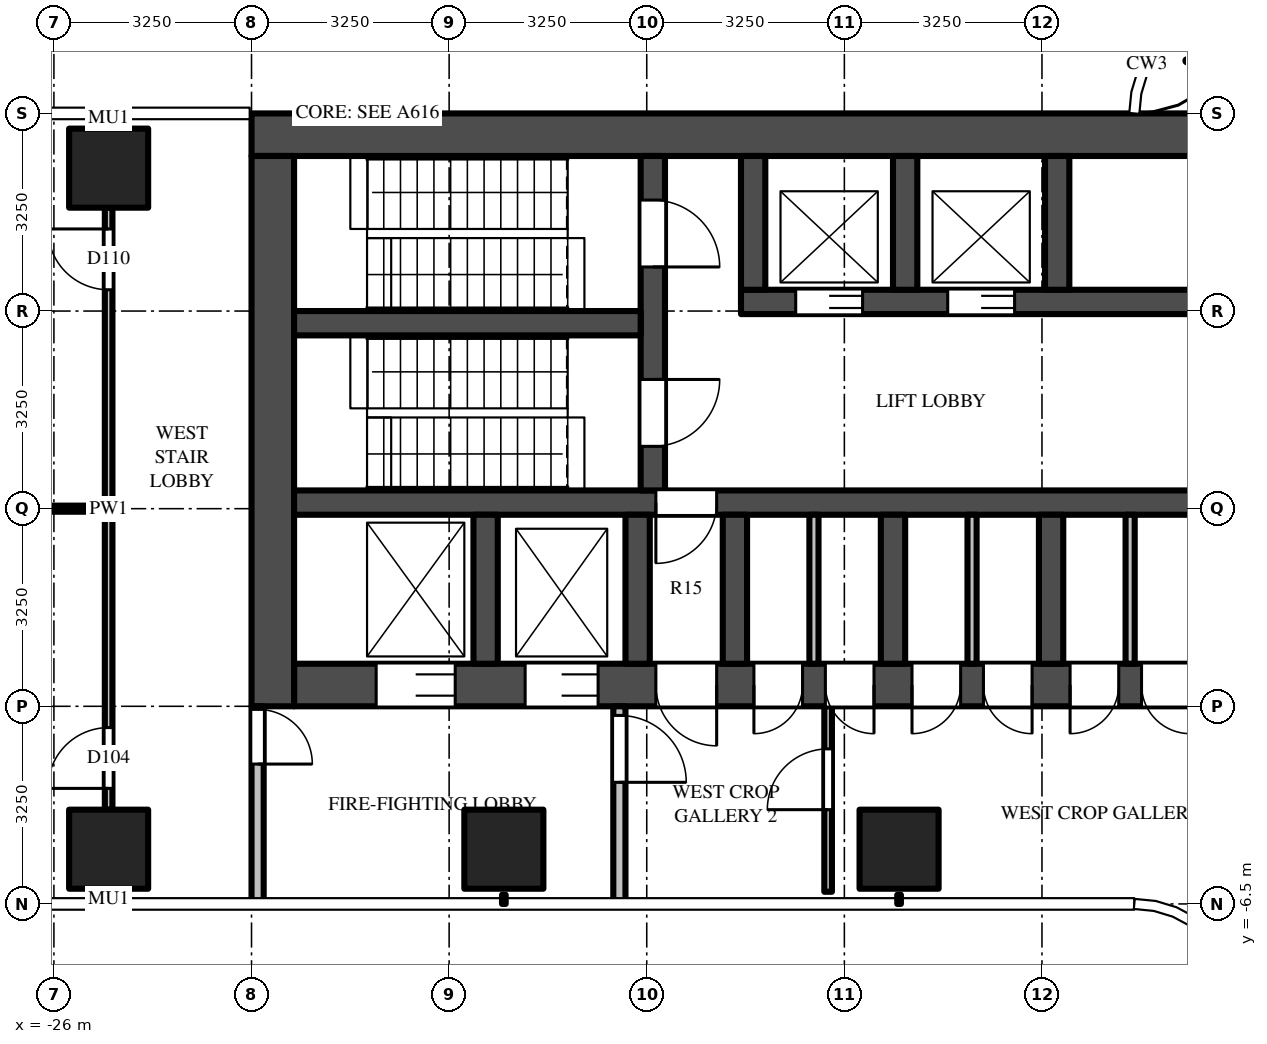
"""IFC4 building model, lengths in metres.
Left out: names, types, materials, properties, quantities, classifications, styles, units other than length and angle.
Written with IfcOpenShell. Run it as: python <this file> out.ifc"""

import sys

from ifc_helpers import new_model, si_unit, direction, frame, frame_2d, origin, origin_2d, place, context, subcontext, project, spatial, rectangle, extrude, source, transform, mapped, element, fill, save


model = new_model("IFC4")
c1 = context("Model", 3, precision=1e-05, world=origin(), true_north=direction((0.0, 1.0)))
c2 = subcontext(c1, "Body", "Model", "MODEL_VIEW")
j1 = project(units=[si_unit("LENGTHUNIT", "METRE"), si_unit("PLANEANGLEUNIT", "RADIAN")], contexts=[c1])
p1 = place(None, origin())
s1 = spatial("IfcSite", under=j1, at=p1, CompositionType="ELEMENT")
p2 = place(p1, origin())
s2 = spatial("IfcBuilding", under=s1, at=p2, CompositionType="ELEMENT")
p3 = place(p2, frame((0.0, 0.0, 142.5)))
s3 = spatial("IfcBuildingStorey", under=s2, at=p3, CompositionType="ELEMENT", Elevation=142.5)
m1 = source(origin(), c2, "Body", "SweptSolid", [
    extrude(rectangle(XDim=1.3, YDim=1.3, at=origin_2d()), origin(), (0.0, 0.0, 1.0), 4.5),
])
for number, where, z_axis, x_axis in (
    (1, (-12.1, -5.6, 0.0), (0.0, 0.0, 1.0), (1.0, 0.0, 0.0)),
    (2, (-18.6, -5.6, 0.0), (0.0, 0.0, 1.0), (1.0, 0.0, 0.0)),
    (3, (-25.1, -5.6, 0.0), (0.0, 0.0, 1.0), (1.0, 0.0, 0.0)),
    (4, (-25.1, 5.6, 0.0), (0.0, 0.0, 1.0), (1.0, 0.0, 0.0)),
):
    element("IfcColumn", number, at=place(p3, frame(where, z_axis=z_axis, x_axis=x_axis)), inside=s3, PredefinedType="COLUMN", context=c2, shape_type="MappedRepresentation", body=[
        mapped(m1, transform((0.0, 0.0, 0.0))),
    ])
m2 = source(origin(), c2, "Body", "SweptSolid", [
    extrude(rectangle(XDim=16.5, YDim=0.7, at=frame_2d((8.25, 0.0))), origin(), (0.0, 0.0, 1.0), 4.25),
])
p4 = place(p3, frame((-6.25, 6.15, 0.0), z_axis=(0.0, 0.0, 1.0), x_axis=(-1.0, 0.0, 0.0)))
e5 = element("IfcWall", 5, at=p4, inside=s3, PredefinedType="SHEAR", context=c2, shape_type="MappedRepresentation", body=[
    mapped(m2, transform((0.0, 0.0, 0.0))),
])
m3 = source(origin(), c2, "Body", "SweptSolid", [
    extrude(rectangle(XDim=14.85, YDim=0.7, at=frame_2d((7.425, 0.0))), origin(), (0.0, 0.0, 1.0), 4.25),
])
p5 = place(p3, frame((-7.2, -2.9, 0.0), z_axis=(0.0, 0.0, 1.0), x_axis=(-1.0, 0.0, 0.0)))
e6 = element("IfcWall", 6, at=p5, inside=s3, PredefinedType="SHEAR", context=c2, shape_type="MappedRepresentation", body=[
    mapped(m3, transform((0.0, 0.0, 0.0))),
])
m4 = source(origin(), c2, "Body", "SweptSolid", [
    extrude(rectangle(XDim=1.3, YDim=2.1, at=frame_2d((0.65, 1.05))), frame((0.0, 0.36, 0.0), z_axis=(0.0, -1.0, 0.0), x_axis=(1.0, 0.0, 0.0)), (0.0, 0.0, 1.0), 0.72),
])
p6 = place(p5, frame((12.2, 0.0, 0.0)))
e7 = element("IfcOpeningElement", 7, at=p6, cuts=e6, PredefinedType="OPENING", context=c2, shape_type="MappedRepresentation", body=[
    mapped(m4, transform((0.0, 0.0, 0.0))),
])
m5 = source(origin(), c2, "Body", "SweptSolid", [
    extrude(rectangle(XDim=1.2, YDim=2.1, at=frame_2d((0.6, 1.05))), frame((0.0, 0.36, 0.0), z_axis=(0.0, -1.0, 0.0), x_axis=(1.0, 0.0, 0.0)), (0.0, 0.0, 1.0), 0.72),
])
p7 = place(p5, frame((9.85, 0.0, 0.0)))
e8 = element("IfcOpeningElement", 8, at=p7, cuts=e6, PredefinedType="OPENING", context=c2, shape_type="MappedRepresentation", body=[
    mapped(m5, transform((0.0, 0.0, 0.0))),
])
m6 = source(origin(), c2, "Body", "SweptSolid", [
    extrude(rectangle(XDim=1.0, YDim=2.1, at=frame_2d((0.5, 1.05))), frame((0.0, 0.36, 0.0), z_axis=(0.0, -1.0, 0.0), x_axis=(1.0, 0.0, 0.0)), (0.0, 0.0, 1.0), 0.72),
])
p8 = place(p5, frame((7.9, 0.0, 0.0)))
e9 = element("IfcOpeningElement", 9, at=p8, cuts=e6, PredefinedType="OPENING", context=c2, shape_type="MappedRepresentation", body=[
    mapped(m6, transform((0.0, 0.0, 0.0))),
])
m7 = source(origin(), c2, "Body", "SweptSolid", [
    extrude(rectangle(XDim=0.8, YDim=2.1, at=frame_2d((0.4, 1.05))), frame((0.0, 0.36, 0.0), z_axis=(0.0, -1.0, 0.0), x_axis=(1.0, 0.0, 0.0)), (0.0, 0.0, 1.0), 0.72),
])
p9 = place(p5, frame((0.113, 0.0, 0.0)))
e10 = element("IfcOpeningElement", 10, at=p9, cuts=e6, PredefinedType="OPENING", context=c2, shape_type="MappedRepresentation", body=[
    mapped(m7, transform((0.0, 0.0, 0.0))),
])
p10 = place(p5, frame((1.288, 0.0, 0.0)))
e11 = element("IfcOpeningElement", 11, at=p10, cuts=e6, PredefinedType="OPENING", context=c2, shape_type="MappedRepresentation", body=[
    mapped(m7, transform((0.0, 0.0, 0.0))),
])
p11 = place(p5, frame((2.712, 0.0, 0.0)))
e12 = element("IfcOpeningElement", 12, at=p11, cuts=e6, PredefinedType="OPENING", context=c2, shape_type="MappedRepresentation", body=[
    mapped(m7, transform((0.0, 0.0, 0.0))),
])
p12 = place(p5, frame((3.887, 0.0, 0.0)))
e13 = element("IfcOpeningElement", 13, at=p12, cuts=e6, PredefinedType="OPENING", context=c2, shape_type="MappedRepresentation", body=[
    mapped(m7, transform((0.0, 0.0, 0.0))),
])
p13 = place(p5, frame((5.312, 0.0, 0.0)))
e14 = element("IfcOpeningElement", 14, at=p13, cuts=e6, PredefinedType="OPENING", context=c2, shape_type="MappedRepresentation", body=[
    mapped(m7, transform((0.0, 0.0, 0.0))),
])
p14 = place(p5, frame((6.488, 0.0, 0.0)))
e15 = element("IfcOpeningElement", 15, at=p14, cuts=e6, PredefinedType="OPENING", context=c2, shape_type="MappedRepresentation", body=[
    mapped(m7, transform((0.0, 0.0, 0.0))),
])
m8 = source(origin(), c2, "Body", "SweptSolid", [
    extrude(rectangle(XDim=9.05, YDim=0.7, at=frame_2d((4.525, 0.0))), origin(), (0.0, 0.0, 1.0), 4.25),
])
p15 = place(p3, frame((-22.4, 5.8, 0.0), z_axis=(0.0, 0.0, 1.0), x_axis=(0.0, -1.0, 0.0)))
e16 = element("IfcWall", 16, at=p15, inside=s3, PredefinedType="SHEAR", context=c2, shape_type="MappedRepresentation", body=[
    mapped(m8, transform((0.0, 0.0, 0.0))),
])
m9 = source(origin(), c2, "Body", "SweptSolid", [
    extrude(rectangle(XDim=7.5, YDim=0.4, at=frame_2d((3.75, 0.0))), origin(), (0.0, 0.0, 1.0), 4.25),
])
p16 = place(p3, frame((-7.2, 3.4, 0.0), z_axis=(0.0, 0.0, 1.0), x_axis=(-1.0, 0.0, 0.0)))
e17 = element("IfcWall", 17, at=p16, inside=s3, PredefinedType="SHEAR", context=c2, shape_type="MappedRepresentation", body=[
    mapped(m9, transform((0.0, 0.0, 0.0))),
])
m10 = source(origin(), c2, "Body", "SweptSolid", [
    extrude(rectangle(XDim=1.1, YDim=2.1, at=frame_2d((0.55, 1.05))), frame((0.0, 0.21, 0.0), z_axis=(0.0, -1.0, 0.0), x_axis=(1.0, 0.0, 0.0)), (0.0, 0.0, 1.0), 0.42),
])
p17 = place(p16, frame((3.0, 0.0, 0.0)))
e18 = element("IfcOpeningElement", 18, at=p17, cuts=e17, PredefinedType="OPENING", context=c2, shape_type="MappedRepresentation", body=[
    mapped(m10, transform((0.0, 0.0, 0.0))),
])
p18 = place(p16, frame((5.5, 0.0, 0.0)))
e19 = element("IfcOpeningElement", 19, at=p18, cuts=e17, PredefinedType="OPENING", context=c2, shape_type="MappedRepresentation", body=[
    mapped(m10, transform((0.0, 0.0, 0.0))),
])
m11 = source(origin(), c2, "Body", "SweptSolid", [
    extrude(rectangle(XDim=14.85, YDim=0.4, at=frame_2d((7.425, 0.0))), origin(), (0.0, 0.0, 1.0), 4.25),
])
p19 = place(p3, frame((-7.2, 0.1, 0.0), z_axis=(0.0, 0.0, 1.0), x_axis=(-1.0, 0.0, 0.0)))
e20 = element("IfcWall", 20, at=p19, inside=s3, PredefinedType="SHEAR", context=c2, shape_type="MappedRepresentation", body=[
    mapped(m11, transform((0.0, 0.0, 0.0))),
])
m12 = source(origin(), c2, "Body", "SweptSolid", [
    extrude(rectangle(XDim=1.0, YDim=2.1, at=frame_2d((0.5, 1.05))), frame((0.0, 0.21, 0.0), z_axis=(0.0, -1.0, 0.0), x_axis=(1.0, 0.0, 0.0)), (0.0, 0.0, 1.0), 0.42),
])
p20 = place(p19, frame((7.9, 0.0, 0.0)))
e21 = element("IfcOpeningElement", 21, at=p20, cuts=e20, PredefinedType="OPENING", context=c2, shape_type="MappedRepresentation", body=[
    mapped(m12, transform((0.0, 0.0, 0.0))),
])
m13 = source(origin(), c2, "Body", "SweptSolid", [
    extrude(rectangle(XDim=5.5, YDim=0.4, at=frame_2d((2.75, 0.0))), origin(), (0.0, 0.0, 1.0), 4.25),
])
p21 = place(p3, frame((-16.15, 5.8, 0.0), z_axis=(0.0, 0.0, 1.0), x_axis=(0.0, -1.0, 0.0)))
e22 = element("IfcWall", 22, at=p21, inside=s3, PredefinedType="SHEAR", context=c2, shape_type="MappedRepresentation", body=[
    mapped(m13, transform((0.0, 0.0, 0.0))),
])
p22 = place(p21, frame((0.725, 0.0, 0.0)))
e23 = element("IfcOpeningElement", 23, at=p22, cuts=e22, PredefinedType="OPENING", context=c2, shape_type="MappedRepresentation", body=[
    mapped(m10, transform((0.0, 0.0, 0.0))),
])
p23 = place(p21, frame((3.675, 0.0, 0.0)))
e24 = element("IfcOpeningElement", 24, at=p23, cuts=e22, PredefinedType="OPENING", context=c2, shape_type="MappedRepresentation", body=[
    mapped(m10, transform((0.0, 0.0, 0.0))),
])
m14 = source(origin(), c2, "Body", "SweptSolid", [
    extrude(rectangle(XDim=5.7, YDim=0.4, at=frame_2d((2.85, 0.0))), origin(), (0.0, 0.0, 1.0), 4.25),
])
p24 = place(p3, frame((-16.35, 3.05, 0.0), z_axis=(0.0, 0.0, 1.0), x_axis=(-1.0, 0.0, 0.0)))
e25 = element("IfcWall", 25, at=p24, inside=s3, PredefinedType="SHEAR", context=c2, shape_type="MappedRepresentation", body=[
    mapped(m14, transform((0.0, 0.0, 0.0))),
])
m15 = source(origin(), c2, "Body", "SweptSolid", [
    extrude(rectangle(XDim=2.2, YDim=0.4, at=frame_2d((1.1, 0.0))), origin(), (0.0, 0.0, 1.0), 4.25),
])
for number, where, z_axis, x_axis in (
    (26, (-9.5, 5.8, 0.0), (0.0, 0.0, 1.0), (0.0, -1.0, 0.0)),
    (27, (-12.0, 5.8, 0.0), (0.0, 0.0, 1.0), (0.0, -1.0, 0.0)),
    (28, (-14.5, 5.8, 0.0), (0.0, 0.0, 1.0), (0.0, -1.0, 0.0)),
):
    element("IfcWall", number, at=place(p3, frame(where, z_axis=z_axis, x_axis=x_axis)), inside=s3, PredefinedType="SHEAR", context=c2, shape_type="MappedRepresentation", body=[
        mapped(m15, transform((0.0, 0.0, 0.0))),
    ])
m16 = source(origin(), c2, "Body", "SweptSolid", [
    extrude(rectangle(XDim=2.45, YDim=0.4, at=frame_2d((1.225, 0.0))), origin(), (0.0, 0.0, 1.0), 4.25),
])
for number, where, z_axis, x_axis in (
    (29, (-9.6, -0.1, 0.0), (0.0, 0.0, 1.0), (0.0, -1.0, 0.0)),
    (30, (-12.2, -0.1, 0.0), (0.0, 0.0, 1.0), (0.0, -1.0, 0.0)),
    (31, (-14.8, -0.1, 0.0), (0.0, 0.0, 1.0), (0.0, -1.0, 0.0)),
    (32, (-16.4, -0.1, 0.0), (0.0, 0.0, 1.0), (0.0, -1.0, 0.0)),
    (33, (-18.9, -0.1, 0.0), (0.0, 0.0, 1.0), (0.0, -1.0, 0.0)),
):
    element("IfcWall", number, at=place(p3, frame(where, z_axis=z_axis, x_axis=x_axis)), inside=s3, PredefinedType="SHEAR", context=c2, shape_type="MappedRepresentation", body=[
        mapped(m16, transform((0.0, 0.0, 0.0))),
    ])
m17 = source(origin(), c2, "Body", "SweptSolid", [
    extrude(rectangle(XDim=3.25, YDim=0.2, at=frame_2d((1.625, 0.0))), origin(), (0.0, 0.0, 1.0), 4.25),
])
p25 = place(p3, frame((-16.7, -3.25, 0.0), z_axis=(0.0, 0.0, 1.0), x_axis=(0.0, -1.0, 0.0)))
e34 = element("IfcWall", 34, at=p25, inside=s3, PredefinedType="PARTITIONING", context=c2, shape_type="MappedRepresentation", body=[
    mapped(m17, transform((0.0, 0.0, 0.0))),
])
m18 = source(origin(), c2, "Body", "SweptSolid", [
    extrude(rectangle(XDim=1.1, YDim=2.1, at=frame_2d((0.55, 1.05))), frame((0.0, 0.11, 0.0), z_axis=(0.0, -1.0, 0.0), x_axis=(1.0, 0.0, 0.0)), (0.0, 0.0, 1.0), 0.22),
])
p26 = place(p25, frame((0.15, 0.0, 0.0)))
e35 = element("IfcOpeningElement", 35, at=p26, cuts=e34, PredefinedType="OPENING", context=c2, shape_type="MappedRepresentation", body=[
    mapped(m18, transform((0.0, 0.0, 0.0))),
])
p27 = place(p3, frame((-22.65, -3.25, 0.0), z_axis=(0.0, 0.0, 1.0), x_axis=(0.0, -1.0, 0.0)))
e36 = element("IfcWall", 36, at=p27, inside=s3, PredefinedType="PARTITIONING", context=c2, shape_type="MappedRepresentation", body=[
    mapped(m17, transform((0.0, 0.0, 0.0))),
])
m19 = source(origin(), c2, "Body", "SweptSolid", [
    extrude(rectangle(XDim=0.9, YDim=2.1, at=frame_2d((0.45, 1.05))), frame((0.0, 0.11, 0.0), z_axis=(0.0, -1.0, 0.0), x_axis=(1.0, 0.0, 0.0)), (0.0, 0.0, 1.0), 0.22),
])
p28 = place(p27, frame((0.05, 0.0, 0.0)))
e37 = element("IfcOpeningElement", 37, at=p28, cuts=e36, PredefinedType="OPENING", context=c2, shape_type="MappedRepresentation", body=[
    mapped(m19, transform((0.0, 0.0, 0.0))),
])
m20 = source(origin(), c2, "Body", "SweptSolid", [
    extrude(rectangle(XDim=2.45, YDim=0.15, at=frame_2d((1.225, 0.0))), origin(), (0.0, 0.0, 1.0), 4.25),
])
for number, where, z_axis, x_axis in (
    (38, (-8.3, -0.1, 0.0), (0.0, 0.0, 1.0), (0.0, -1.0, 0.0)),
    (39, (-10.9, -0.1, 0.0), (0.0, 0.0, 1.0), (0.0, -1.0, 0.0)),
    (40, (-13.5, -0.1, 0.0), (0.0, 0.0, 1.0), (0.0, -1.0, 0.0)),
):
    element("IfcWall", number, at=place(p3, frame(where, z_axis=z_axis, x_axis=x_axis)), inside=s3, PredefinedType="PARTITIONING", context=c2, shape_type="MappedRepresentation", body=[
        mapped(m20, transform((0.0, 0.0, 0.0))),
    ])
m21 = source(origin(), c2, "Body", "SweptSolid", [
    extrude(rectangle(XDim=9.9, YDim=0.125, at=frame_2d((4.95, 0.0))), origin(), (0.0, 0.0, 1.0), 3.468),
])
p29 = place(p3, frame((-25.1, -4.95, 0.0), z_axis=(0.0, 0.0, 1.0), x_axis=(0.0, 1.0, 0.0)))
e41 = element("IfcWall", 41, at=p29, inside=s3, PredefinedType="PARTITIONING", context=c2, shape_type="MappedRepresentation", body=[
    mapped(m21, transform((0.0, 0.0, 0.0))),
])
m22 = source(origin(), c2, "Body", "SweptSolid", [
    extrude(rectangle(XDim=1.0, YDim=2.1, at=frame_2d((0.5, 1.05))), frame((0.0, 0.073, 0.0), z_axis=(0.0, -1.0, 0.0), x_axis=(1.0, 0.0, 0.0)), (0.0, 0.0, 1.0), 0.145),
])
p30 = place(p29, frame((0.35, 0.0, 0.0)))
e42 = element("IfcOpeningElement", 42, at=p30, cuts=e41, PredefinedType="OPENING", context=c2, shape_type="MappedRepresentation", body=[
    mapped(m22, transform((0.0, 0.0, 0.0))),
])
p31 = place(p29, frame((8.55, 0.0, 0.0)))
e43 = element("IfcOpeningElement", 43, at=p31, cuts=e41, PredefinedType="OPENING", context=c2, shape_type="MappedRepresentation", body=[
    mapped(m22, transform((0.0, 0.0, 0.0))),
])
m23 = source(origin(), c2, "Body", "SweptSolid", [
    extrude(rectangle(XDim=3.05, YDim=0.125, at=frame_2d((1.525, 0.0))), origin(), (0.0, 0.0, 1.0), 3.33),
])
p32 = place(p3, frame((-13.267, -6.3, 0.0), z_axis=(0.0, 0.0, 1.0), x_axis=(0.0, 1.0, 0.0)))
e44 = element("IfcWall", 44, at=p32, inside=s3, PredefinedType="PARTITIONING", context=c2, shape_type="MappedRepresentation", body=[
    mapped(m23, transform((0.0, 0.0, 0.0))),
])
p33 = place(p32, frame((1.35, 0.0, 0.0)))
e45 = element("IfcOpeningElement", 45, at=p33, cuts=e44, PredefinedType="OPENING", context=c2, shape_type="MappedRepresentation", body=[
    mapped(m22, transform((0.0, 0.0, 0.0))),
])
m24 = source(origin(), c2, "Body", "SweptSolid", [
    extrude(rectangle(XDim=7.137, YDim=0.1, at=frame_2d((3.569, 0.0))), origin(), (0.0, 0.0, 1.0), 3.33),
])
p34 = place(p3, frame((-32.3, 0.0, 0.0), z_axis=(0.0, 0.0, 1.0), x_axis=(1.0, 0.0, 0.0)))
e46 = element("IfcWall", 46, at=p34, inside=s3, PredefinedType="PARTITIONING", context=c2, shape_type="MappedRepresentation", body=[
    mapped(m24, transform((0.0, 0.0, 0.0))),
])
m25 = source(origin(), c2, "Body", "SweptSolid", [
    extrude(rectangle(XDim=1.1, YDim=2.1, at=frame_2d((0.55, 1.05))), frame((0.0, 0.025, 0.0), z_axis=(0.0, -1.0, 0.0), x_axis=(1.0, 0.0, 0.0)), (0.0, 0.0, 1.0), 0.05),
])
p35 = place(p17, origin())
e47 = element("IfcDoor", 47, at=p35, inside=s3, OperationType="DOUBLE_DOOR_SLIDING", PredefinedType="DOOR", context=c2, shape_type="MappedRepresentation", body=[
    mapped(m25, transform((0.0, 0.0, 0.0))),
])
fill(e18, e47)
p36 = place(p18, origin())
e48 = element("IfcDoor", 48, at=p36, inside=s3, OperationType="DOUBLE_DOOR_SLIDING", PredefinedType="DOOR", context=c2, shape_type="MappedRepresentation", body=[
    mapped(m25, transform((0.0, 0.0, 0.0))),
])
fill(e19, e48)
m26 = source(origin(), c2, "Body", "SweptSolid", [
    extrude(rectangle(XDim=1.3, YDim=2.1, at=frame_2d((0.65, 1.05))), frame((0.0, -0.275, 0.0), z_axis=(0.0, -1.0, 0.0), x_axis=(1.0, 0.0, 0.0)), (0.0, 0.0, 1.0), 0.05),
])
p37 = place(p6, origin())
e49 = element("IfcDoor", 49, at=p37, inside=s3, OperationType="DOUBLE_DOOR_SLIDING", PredefinedType="DOOR", context=c2, shape_type="MappedRepresentation", body=[
    mapped(m26, transform((0.0, 0.0, 0.0))),
])
fill(e7, e49)
m27 = source(origin(), c2, "Body", "SweptSolid", [
    extrude(rectangle(XDim=1.2, YDim=2.1, at=frame_2d((0.6, 1.05))), frame((0.0, -0.275, 0.0), z_axis=(0.0, -1.0, 0.0), x_axis=(1.0, 0.0, 0.0)), (0.0, 0.0, 1.0), 0.05),
])
p38 = place(p7, origin())
e50 = element("IfcDoor", 50, at=p38, inside=s3, OperationType="DOUBLE_DOOR_SLIDING", PredefinedType="DOOR", context=c2, shape_type="MappedRepresentation", body=[
    mapped(m27, transform((0.0, 0.0, 0.0))),
])
fill(e8, e50)
p39 = place(p22, origin())
e51 = element("IfcDoor", 51, at=p39, inside=s3, OperationType="SINGLE_SWING_RIGHT", PredefinedType="DOOR", context=c2, shape_type="MappedRepresentation", body=[
    mapped(m25, transform((0.0, 0.0, 0.0))),
])
fill(e23, e51)
p40 = place(p23, origin())
e52 = element("IfcDoor", 52, at=p40, inside=s3, OperationType="SINGLE_SWING_LEFT", PredefinedType="DOOR", context=c2, shape_type="MappedRepresentation", body=[
    mapped(m25, transform((0.0, 0.0, 0.0))),
])
fill(e24, e52)
m28 = source(origin(), c2, "Body", "SweptSolid", [
    extrude(rectangle(XDim=1.0, YDim=2.1, at=frame_2d((0.5, 1.05))), frame((0.0, 0.025, 0.0), z_axis=(0.0, -1.0, 0.0), x_axis=(1.0, 0.0, 0.0)), (0.0, 0.0, 1.0), 0.05),
])
p41 = place(p20, origin())
e53 = element("IfcDoor", 53, at=p41, inside=s3, OperationType="SINGLE_SWING_RIGHT", PredefinedType="DOOR", context=c2, shape_type="MappedRepresentation", body=[
    mapped(m28, transform((0.0, 0.0, 0.0))),
])
fill(e21, e53)
m29 = source(origin(), c2, "Body", "SweptSolid", [
    extrude(rectangle(XDim=1.0, YDim=2.1, at=frame_2d((0.5, 1.05))), frame((0.0, -0.275, 0.0), z_axis=(0.0, -1.0, 0.0), x_axis=(1.0, 0.0, 0.0)), (0.0, 0.0, 1.0), 0.05),
])
p42 = place(p8, origin())
e54 = element("IfcDoor", 54, at=p42, inside=s3, OperationType="SINGLE_SWING_LEFT", PredefinedType="DOOR", context=c2, shape_type="MappedRepresentation", body=[
    mapped(m29, transform((0.0, 0.0, 0.0))),
])
fill(e9, e54)
p43 = place(p26, origin())
e55 = element("IfcDoor", 55, at=p43, inside=s3, OperationType="SINGLE_SWING_RIGHT", PredefinedType="DOOR", context=c2, shape_type="MappedRepresentation", body=[
    mapped(m25, transform((0.0, 0.0, 0.0))),
])
fill(e35, e55)
m30 = source(origin(), c2, "Body", "SweptSolid", [
    extrude(rectangle(XDim=0.9, YDim=2.1, at=frame_2d((0.45, 1.05))), frame((0.0, 0.025, 0.0), z_axis=(0.0, -1.0, 0.0), x_axis=(1.0, 0.0, 0.0)), (0.0, 0.0, 1.0), 0.05),
])
p44 = place(p28, origin())
e56 = element("IfcDoor", 56, at=p44, inside=s3, OperationType="SINGLE_SWING_RIGHT", PredefinedType="DOOR", context=c2, shape_type="MappedRepresentation", body=[
    mapped(m30, transform((0.0, 0.0, 0.0))),
])
fill(e37, e56)
m31 = source(origin(), c2, "Body", "SweptSolid", [
    extrude(rectangle(XDim=0.8, YDim=2.1, at=frame_2d((0.4, 1.05))), frame((0.0, -0.275, 0.0), z_axis=(0.0, -1.0, 0.0), x_axis=(1.0, 0.0, 0.0)), (0.0, 0.0, 1.0), 0.05),
])
p45 = place(p9, origin())
e57 = element("IfcDoor", 57, at=p45, inside=s3, OperationType="SINGLE_SWING_LEFT", PredefinedType="DOOR", context=c2, shape_type="MappedRepresentation", body=[
    mapped(m31, transform((0.0, 0.0, 0.0))),
])
fill(e10, e57)
p46 = place(p10, origin())
e58 = element("IfcDoor", 58, at=p46, inside=s3, OperationType="SINGLE_SWING_RIGHT", PredefinedType="DOOR", context=c2, shape_type="MappedRepresentation", body=[
    mapped(m31, transform((0.0, 0.0, 0.0))),
])
fill(e11, e58)
p47 = place(p11, origin())
e59 = element("IfcDoor", 59, at=p47, inside=s3, OperationType="SINGLE_SWING_LEFT", PredefinedType="DOOR", context=c2, shape_type="MappedRepresentation", body=[
    mapped(m31, transform((0.0, 0.0, 0.0))),
])
fill(e12, e59)
p48 = place(p12, origin())
e60 = element("IfcDoor", 60, at=p48, inside=s3, OperationType="SINGLE_SWING_RIGHT", PredefinedType="DOOR", context=c2, shape_type="MappedRepresentation", body=[
    mapped(m31, transform((0.0, 0.0, 0.0))),
])
fill(e13, e60)
p49 = place(p13, origin())
e61 = element("IfcDoor", 61, at=p49, inside=s3, OperationType="SINGLE_SWING_LEFT", PredefinedType="DOOR", context=c2, shape_type="MappedRepresentation", body=[
    mapped(m31, transform((0.0, 0.0, 0.0))),
])
fill(e14, e61)
p50 = place(p14, origin())
e62 = element("IfcDoor", 62, at=p50, inside=s3, OperationType="SINGLE_SWING_RIGHT", PredefinedType="DOOR", context=c2, shape_type="MappedRepresentation", body=[
    mapped(m31, transform((0.0, 0.0, 0.0))),
])
fill(e15, e62)
p51 = place(p33, origin())
e63 = element("IfcDoor", 63, at=p51, inside=s3, OperationType="SINGLE_SWING_LEFT", PredefinedType="DOOR", context=c2, shape_type="MappedRepresentation", body=[
    mapped(m28, transform((0.0, 0.0, 0.0))),
])
fill(e45, e63)
p52 = place(p30, origin())
e64 = element("IfcDoor", 64, at=p52, inside=s3, OperationType="SINGLE_SWING_LEFT", PredefinedType="DOOR", context=c2, shape_type="MappedRepresentation", body=[
    mapped(m28, transform((0.0, 0.0, 0.0))),
])
fill(e42, e64)
p53 = place(p31, origin())
e65 = element("IfcDoor", 65, at=p53, inside=s3, OperationType="SINGLE_SWING_RIGHT", PredefinedType="DOOR", context=c2, shape_type="MappedRepresentation", body=[
    mapped(m28, transform((0.0, 0.0, 0.0))),
])
fill(e43, e65)
save(model, sys.argv[1])
